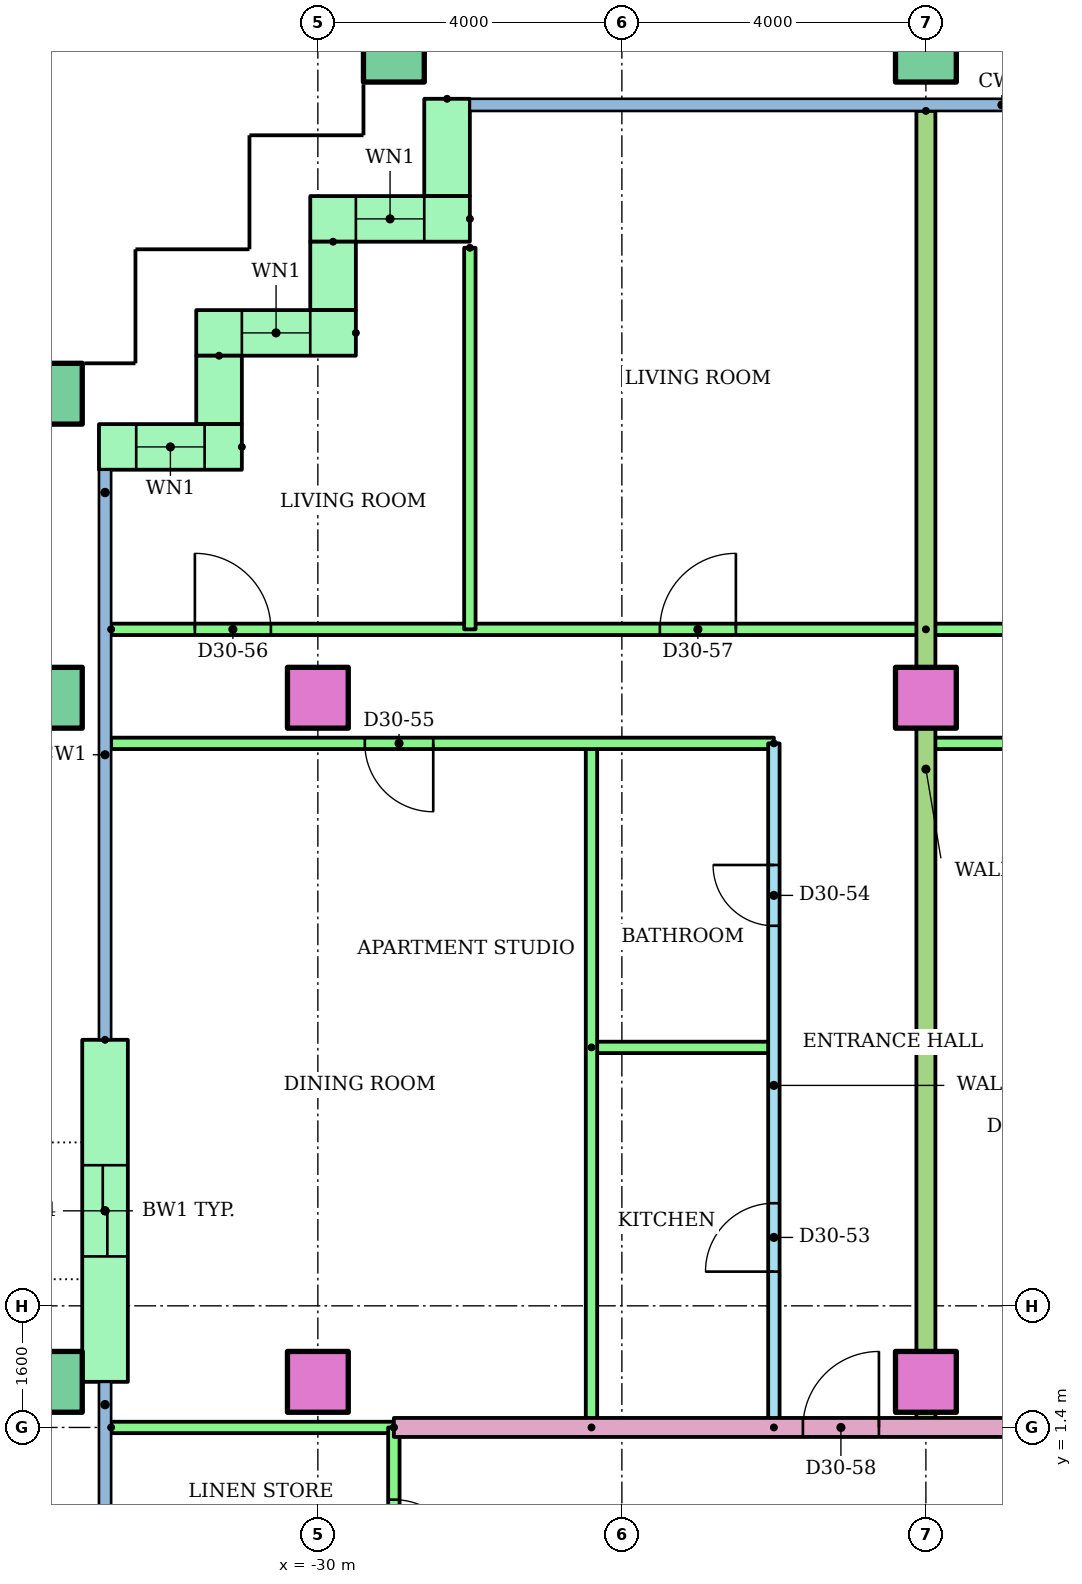
"""IFC4 building model, lengths in metres.
Left out: names, types, materials, properties, quantities, classifications, styles, units other than length and angle.
Written with IfcOpenShell. Run it as: python <this file> out.ifc"""

import sys

from ifc_helpers import new_model, si_unit, direction, frame, frame_2d, origin, origin_2d, place, context, subcontext, project, spatial, rectangle, hollow_rectangle, extrude, element, fill, save


model = new_model("IFC4")
c1 = context("Model", 3, precision=1e-05, world=origin(), true_north=direction((0.0, 1.0)))
c2 = subcontext(c1, "Body", "Model", "MODEL_VIEW")
j1 = project(units=[si_unit("LENGTHUNIT", "METRE"), si_unit("PLANEANGLEUNIT", "RADIAN")], contexts=[c1])
p1 = place(None, origin())
s1 = spatial("IfcSite", under=j1, at=p1, CompositionType="ELEMENT")
p2 = place(p1, origin())
s2 = spatial("IfcBuilding", under=s1, at=p2, CompositionType="ELEMENT")
p3 = place(p2, frame((0.0, 0.0, 119.8)))
s3 = spatial("IfcBuildingStorey", under=s2, at=p3, CompositionType="ELEMENT", Elevation=119.8)
p4 = place(p3, frame((-33.5, 2.0, 0.0)))
e1 = element("IfcColumn", 1, at=p4, inside=s3, PredefinedType="COLUMN", context=c2, shape_type="SweptSolid", body=[
    extrude(hollow_rectangle(XDim=0.8, YDim=0.8, WallThickness=0.04, at=origin_2d()), origin(), (0.0, 0.0, 1.0), 3.2),
])
for number, where in (
    (2, (-30.0, 2.0, 0.0)),
    (3, (-22.0, 2.0, 0.0)),
):
    element("IfcColumn", number, at=place(p3, frame(where)), inside=s3, PredefinedType="COLUMN", context=c2, shape_type="SweptSolid", body=[
        extrude(rectangle(XDim=0.8, YDim=0.8, at=origin_2d()), origin(), (0.0, 0.0, 1.0), 3.2),
    ])
p5 = place(p3, frame((-33.5, 11.0, 0.0)))
e4 = element("IfcColumn", 4, at=p5, inside=s3, PredefinedType="COLUMN", context=c2, shape_type="SweptSolid", body=[
    extrude(hollow_rectangle(XDim=0.8, YDim=0.8, WallThickness=0.04, at=origin_2d()), origin(), (0.0, 0.0, 1.0), 3.2),
])
for number, where in (
    (5, (-30.0, 11.0, 0.0)),
    (6, (-22.0, 11.0, 0.0)),
):
    element("IfcColumn", number, at=place(p3, frame(where)), inside=s3, PredefinedType="COLUMN", context=c2, shape_type="SweptSolid", body=[
        extrude(rectangle(XDim=0.8, YDim=0.8, at=origin_2d()), origin(), (0.0, 0.0, 1.0), 3.2),
    ])
for number, where in (
    (7, (-33.5, 15.0, 0.0)),
    (8, (-29.0, 19.5, 0.0)),
    (9, (-22.0, 19.5, 0.0)),
):
    element("IfcColumn", number, at=place(p3, frame(where)), inside=s3, PredefinedType="COLUMN", context=c2, shape_type="SweptSolid", body=[
        extrude(hollow_rectangle(XDim=0.8, YDim=0.8, WallThickness=0.04, at=origin_2d()), origin(), (0.0, 0.0, 1.0), 3.2),
    ])
p6 = place(p3, frame((-28.3, 18.88, 0.0), z_axis=(0.0, 0.0, 1.0), x_axis=(0.0, -1.0, 0.0)))
e10 = element("IfcWall", 10, at=p6, inside=s3, PredefinedType="STANDARD", context=c2, shape_type="SweptSolid", body=[
    extrude(rectangle(XDim=1.28, YDim=0.6, at=frame_2d((0.64, 0.0))), origin(), (0.0, 0.0, 1.0), 2.92),
])
p7 = place(p3, frame((-28.0, 17.3, 0.0), z_axis=(0.0, 0.0, 1.0), x_axis=(-1.0, 0.0, 0.0)))
e11 = element("IfcWall", 11, at=p7, inside=s3, PredefinedType="STANDARD", context=c2, shape_type="SweptSolid", body=[
    extrude(rectangle(XDim=2.1, YDim=0.6, at=frame_2d((1.05, 0.0))), origin(), (0.0, 0.0, 1.0), 2.92),
])
p8 = place(p7, frame((0.6, 0.0, 0.9)))
e12 = element("IfcOpeningElement", 12, at=p8, cuts=e11, PredefinedType="OPENING", context=c2, shape_type="SweptSolid", body=[
    extrude(rectangle(XDim=0.9, YDim=1.5, at=frame_2d((0.45, 0.75))), frame((0.0, 0.31, 0.0), z_axis=(0.0, -1.0, 0.0), x_axis=(1.0, 0.0, 0.0)), (0.0, 0.0, 1.0), 0.62),
])
p9 = place(p3, frame((-29.8, 17.0, 0.0), z_axis=(0.0, 0.0, 1.0), x_axis=(0.0, -1.0, 0.0)))
e13 = element("IfcWall", 13, at=p9, inside=s3, PredefinedType="STANDARD", context=c2, shape_type="SweptSolid", body=[
    extrude(rectangle(XDim=0.9, YDim=0.6, at=frame_2d((0.45, 0.0))), origin(), (0.0, 0.0, 1.0), 2.92),
])
p10 = place(p3, frame((-29.5, 15.8, 0.0), z_axis=(0.0, 0.0, 1.0), x_axis=(-1.0, 0.0, 0.0)))
e14 = element("IfcWall", 14, at=p10, inside=s3, PredefinedType="STANDARD", context=c2, shape_type="SweptSolid", body=[
    extrude(rectangle(XDim=2.1, YDim=0.6, at=frame_2d((1.05, 0.0))), origin(), (0.0, 0.0, 1.0), 2.92),
])
p11 = place(p10, frame((0.6, 0.0, 0.9)))
e15 = element("IfcOpeningElement", 15, at=p11, cuts=e14, PredefinedType="OPENING", context=c2, shape_type="SweptSolid", body=[
    extrude(rectangle(XDim=0.9, YDim=1.5, at=frame_2d((0.45, 0.75))), frame((0.0, 0.31, 0.0), z_axis=(0.0, -1.0, 0.0), x_axis=(1.0, 0.0, 0.0)), (0.0, 0.0, 1.0), 0.62),
])
p12 = place(p3, frame((-31.3, 15.5, 0.0), z_axis=(0.0, 0.0, 1.0), x_axis=(0.0, -1.0, 0.0)))
e16 = element("IfcWall", 16, at=p12, inside=s3, PredefinedType="STANDARD", context=c2, shape_type="SweptSolid", body=[
    extrude(rectangle(XDim=0.9, YDim=0.6, at=frame_2d((0.45, 0.0))), origin(), (0.0, 0.0, 1.0), 2.92),
])
p13 = place(p3, frame((-31.0, 14.3, 0.0), z_axis=(0.0, 0.0, 1.0), x_axis=(-1.0, 0.0, 0.0)))
e17 = element("IfcWall", 17, at=p13, inside=s3, PredefinedType="STANDARD", context=c2, shape_type="SweptSolid", body=[
    extrude(rectangle(XDim=1.88, YDim=0.6, at=frame_2d((0.94, 0.0))), origin(), (0.0, 0.0, 1.0), 2.92),
])
p14 = place(p13, frame((0.49, 0.0, 0.9)))
e18 = element("IfcOpeningElement", 18, at=p14, cuts=e17, PredefinedType="OPENING", context=c2, shape_type="SweptSolid", body=[
    extrude(rectangle(XDim=0.9, YDim=1.5, at=frame_2d((0.45, 0.75))), frame((0.0, 0.31, 0.0), z_axis=(0.0, -1.0, 0.0), x_axis=(1.0, 0.0, 0.0)), (0.0, 0.0, 1.0), 0.62),
])
p15 = place(p3, frame((-32.8, 6.5, 0.0), z_axis=(0.0, 0.0, 1.0), x_axis=(0.0, -1.0, 0.0)))
e19 = element("IfcWall", 19, at=p15, inside=s3, PredefinedType="STANDARD", context=c2, shape_type="SweptSolid", body=[
    extrude(rectangle(XDim=4.5, YDim=0.6, at=frame_2d((2.25, 0.0))), origin(), (0.0, 0.0, 1.0), 2.92),
])
p16 = place(p15, frame((1.65, 0.0, 0.0)))
e20 = element("IfcOpeningElement", 20, at=p16, cuts=e19, PredefinedType="OPENING", context=c2, shape_type="SweptSolid", body=[
    extrude(rectangle(XDim=1.2, YDim=2.1, at=frame_2d((0.6, 1.05))), frame((0.0, 0.31, 0.0), z_axis=(0.0, -1.0, 0.0), x_axis=(1.0, 0.0, 0.0)), (0.0, 0.0, 1.0), 0.62),
])
p17 = place(p3, frame((-24.0, 1.4, 0.0), z_axis=(0.0, 0.0, 1.0), x_axis=(0.0, 1.0, 0.0)))
e21 = element("IfcWall", 21, at=p17, inside=s3, PredefinedType="PARTITIONING", context=c2, shape_type="SweptSolid", body=[
    extrude(rectangle(XDim=9.0, YDim=0.15, at=frame_2d((4.5, 0.0))), origin(), (0.0, 0.0, 1.0), 2.4),
])
p18 = place(p17, frame((2.05, 0.0, 0.0)))
e22 = element("IfcOpeningElement", 22, at=p18, cuts=e21, PredefinedType="OPENING", context=c2, shape_type="SweptSolid", body=[
    extrude(rectangle(XDim=0.9, YDim=2.1, at=frame_2d((0.45, 1.05))), frame((0.0, 0.085, 0.0), z_axis=(0.0, -1.0, 0.0), x_axis=(1.0, 0.0, 0.0)), (0.0, 0.0, 1.0), 0.17),
])
p19 = place(p17, frame((6.6, 0.0, 0.0)))
e23 = element("IfcOpeningElement", 23, at=p19, cuts=e21, PredefinedType="OPENING", context=c2, shape_type="SweptSolid", body=[
    extrude(rectangle(XDim=0.8, YDim=2.1, at=frame_2d((0.4, 1.05))), frame((0.0, 0.085, 0.0), z_axis=(0.0, -1.0, 0.0), x_axis=(1.0, 0.0, 0.0)), (0.0, 0.0, 1.0), 0.17),
])
p20 = place(p3, frame((-26.4, 6.4, 0.0)))
e24 = element("IfcWall", 24, at=p20, inside=s3, PredefinedType="PARTITIONING", context=c2, shape_type="SweptSolid", body=[
    extrude(rectangle(XDim=2.4, YDim=0.15, at=frame_2d((1.2, 0.0))), origin(), (0.0, 0.0, 1.0), 2.4),
])
p21 = place(p3, frame((-26.4, 1.4, 0.0), z_axis=(0.0, 0.0, 1.0), x_axis=(0.0, 1.0, 0.0)))
e25 = element("IfcWall", 25, at=p21, inside=s3, PredefinedType="PARTITIONING", context=c2, shape_type="SweptSolid", body=[
    extrude(rectangle(XDim=9.0, YDim=0.15, at=frame_2d((4.5, 0.0))), origin(), (0.0, 0.0, 1.0), 2.4),
])
p22 = place(p3, frame((-24.0, 10.4, 0.0), z_axis=(0.0, 0.0, 1.0), x_axis=(-1.0, 0.0, 0.0)))
e26 = element("IfcWall", 26, at=p22, inside=s3, PredefinedType="PARTITIONING", context=c2, shape_type="SweptSolid", body=[
    extrude(rectangle(XDim=8.72, YDim=0.15, at=frame_2d((4.36, 0.0))), origin(), (0.0, 0.0, 1.0), 2.4),
])
p23 = place(p22, frame((4.482, 0.0, 0.0)))
e27 = element("IfcOpeningElement", 27, at=p23, cuts=e26, PredefinedType="OPENING", context=c2, shape_type="SweptSolid", body=[
    extrude(rectangle(XDim=0.9, YDim=2.1, at=frame_2d((0.45, 1.05))), frame((0.0, 0.085, 0.0), z_axis=(0.0, -1.0, 0.0), x_axis=(1.0, 0.0, 0.0)), (0.0, 0.0, 1.0), 0.17),
])
p24 = place(p3, frame((-32.72, 11.9, 0.0)))
e28 = element("IfcWall", 28, at=p24, inside=s3, PredefinedType="PARTITIONING", context=c2, shape_type="SweptSolid", body=[
    extrude(rectangle(XDim=10.72, YDim=0.15, at=frame_2d((5.36, 0.0))), origin(), (0.0, 0.0, 1.0), 2.4),
])
p25 = place(p24, frame((1.102, 0.0, 0.0)))
e29 = element("IfcOpeningElement", 29, at=p25, cuts=e28, PredefinedType="OPENING", context=c2, shape_type="SweptSolid", body=[
    extrude(rectangle(XDim=1.0, YDim=2.1, at=frame_2d((0.5, 1.05))), frame((0.0, 0.085, 0.0), z_axis=(0.0, -1.0, 0.0), x_axis=(1.0, 0.0, 0.0)), (0.0, 0.0, 1.0), 0.17),
])
p26 = place(p24, frame((7.22, 0.0, 0.0)))
e30 = element("IfcOpeningElement", 30, at=p26, cuts=e28, PredefinedType="OPENING", context=c2, shape_type="SweptSolid", body=[
    extrude(rectangle(XDim=1.0, YDim=2.1, at=frame_2d((0.5, 1.05))), frame((0.0, 0.085, 0.0), z_axis=(0.0, -1.0, 0.0), x_axis=(1.0, 0.0, 0.0)), (0.0, 0.0, 1.0), 0.17),
])
p27 = place(p3, frame((-28.0, 16.92, 0.0), z_axis=(0.0, 0.0, 1.0), x_axis=(0.0, -1.0, 0.0)))
e31 = element("IfcWall", 31, at=p27, inside=s3, PredefinedType="PARTITIONING", context=c2, shape_type="SweptSolid", body=[
    extrude(rectangle(XDim=5.02, YDim=0.15, at=frame_2d((2.51, 0.0))), origin(), (0.0, 0.0, 1.0), 2.4),
])
p28 = place(p3, frame((-16.0, 10.4, 0.0), z_axis=(0.0, 0.0, 1.0), x_axis=(-1.0, 0.0, 0.0)))
e32 = element("IfcWall", 32, at=p28, inside=s3, PredefinedType="PARTITIONING", context=c2, shape_type="SweptSolid", body=[
    extrude(rectangle(XDim=6.0, YDim=0.15, at=frame_2d((3.0, 0.0))), origin(), (0.0, 0.0, 1.0), 2.4),
])
p29 = place(p28, frame((3.75, 0.0, 0.0)))
e33 = element("IfcOpeningElement", 33, at=p29, cuts=e32, PredefinedType="OPENING", context=c2, shape_type="SweptSolid", body=[
    extrude(rectangle(XDim=0.9, YDim=2.1, at=frame_2d((0.45, 1.05))), frame((0.0, 0.085, 0.0), z_axis=(0.0, -1.0, 0.0), x_axis=(1.0, 0.0, 0.0)), (0.0, 0.0, 1.0), 0.17),
])
p30 = place(p3, frame((-22.0, 11.9, 0.0)))
e34 = element("IfcWall", 34, at=p30, inside=s3, PredefinedType="PARTITIONING", context=c2, shape_type="SweptSolid", body=[
    extrude(rectangle(XDim=8.0, YDim=0.15, at=frame_2d((4.0, 0.0))), origin(), (0.0, 0.0, 1.0), 2.4),
])
p31 = place(p30, frame((3.5, 0.0, 0.0)))
e35 = element("IfcOpeningElement", 35, at=p31, cuts=e34, PredefinedType="OPENING", context=c2, shape_type="SweptSolid", body=[
    extrude(rectangle(XDim=1.0, YDim=2.1, at=frame_2d((0.5, 1.05))), frame((0.0, 0.085, 0.0), z_axis=(0.0, -1.0, 0.0), x_axis=(1.0, 0.0, 0.0)), (0.0, 0.0, 1.0), 0.17),
])
p32 = place(p3, frame((-22.0, 18.721, 0.0), z_axis=(0.0, 0.0, 1.0), x_axis=(0.0, -1.0, 0.0)))
e36 = element("IfcWall", 36, at=p32, inside=s3, PredefinedType="PARTITIONING", context=c2, shape_type="SweptSolid", body=[
    extrude(rectangle(XDim=17.321, YDim=0.25, at=frame_2d((8.661, 0.0))), origin(), (0.0, 0.0, 1.0), 2.4),
])
p33 = place(p3, frame((-29.0, 1.4, 0.0)))
e37 = element("IfcWall", 37, at=p33, inside=s3, PredefinedType="PARTITIONING", context=c2, shape_type="SweptSolid", body=[
    extrude(rectangle(XDim=15.0, YDim=0.25, at=frame_2d((7.5, 0.0))), origin(), (0.0, 0.0, 1.0), 2.4),
])
p34 = place(p33, frame((5.382, 0.0, 0.0)))
e38 = element("IfcOpeningElement", 38, at=p34, cuts=e37, PredefinedType="OPENING", context=c2, shape_type="SweptSolid", body=[
    extrude(rectangle(XDim=1.0, YDim=2.1, at=frame_2d((0.5, 1.05))), frame((0.0, 0.135, 0.0), z_axis=(0.0, -1.0, 0.0), x_axis=(1.0, 0.0, 0.0)), (0.0, 0.0, 1.0), 0.27),
])
p35 = place(p33, frame((13.5, 0.0, 0.0)))
e39 = element("IfcOpeningElement", 39, at=p35, cuts=e37, PredefinedType="OPENING", context=c2, shape_type="SweptSolid", body=[
    extrude(rectangle(XDim=1.0, YDim=2.1, at=frame_2d((0.5, 1.05))), frame((0.0, 0.135, 0.0), z_axis=(0.0, -1.0, 0.0), x_axis=(1.0, 0.0, 0.0)), (0.0, 0.0, 1.0), 0.27),
])
p36 = place(p3, frame((-32.72, 1.4, 0.0)))
e40 = element("IfcWall", 40, at=p36, inside=s3, PredefinedType="PARTITIONING", context=c2, shape_type="SweptSolid", body=[
    extrude(rectangle(XDim=3.72, YDim=0.15, at=frame_2d((1.86, 0.0))), origin(), (0.0, 0.0, 1.0), 2.4),
])
p37 = place(p3, frame((-29.0, 1.4, 0.0), z_axis=(0.0, 0.0, 1.0), x_axis=(0.0, -1.0, 0.0)))
e41 = element("IfcWall", 41, at=p37, inside=s3, PredefinedType="PARTITIONING", context=c2, shape_type="SweptSolid", body=[
    extrude(rectangle(XDim=2.8, YDim=0.15, at=frame_2d((1.4, 0.0))), origin(), (0.0, 0.0, 1.0), 2.4),
])
p38 = place(p37, frame((0.95, 0.0, 0.0)))
e42 = element("IfcOpeningElement", 42, at=p38, cuts=e41, PredefinedType="OPENING", context=c2, shape_type="SweptSolid", body=[
    extrude(rectangle(XDim=0.9, YDim=2.1, at=frame_2d((0.45, 1.05))), frame((0.0, 0.085, 0.0), z_axis=(0.0, -1.0, 0.0), x_axis=(1.0, 0.0, 0.0)), (0.0, 0.0, 1.0), 0.17),
])
p39 = place(p8, origin())
e43 = element("IfcWindow", 43, at=p39, inside=s3, PartitioningType="SINGLE_PANEL", PredefinedType="WINDOW", context=c2, shape_type="SweptSolid", body=[
    extrude(rectangle(XDim=0.9, YDim=1.5, at=frame_2d((0.45, 0.75))), frame((0.0, 0.03, 0.0), z_axis=(0.0, -1.0, 0.0), x_axis=(1.0, 0.0, 0.0)), (0.0, 0.0, 1.0), 0.06),
])
fill(e12, e43)
p40 = place(p11, origin())
e44 = element("IfcWindow", 44, at=p40, inside=s3, PartitioningType="SINGLE_PANEL", PredefinedType="WINDOW", context=c2, shape_type="SweptSolid", body=[
    extrude(rectangle(XDim=0.9, YDim=1.5, at=frame_2d((0.45, 0.75))), frame((0.0, 0.03, 0.0), z_axis=(0.0, -1.0, 0.0), x_axis=(1.0, 0.0, 0.0)), (0.0, 0.0, 1.0), 0.06),
])
fill(e15, e44)
p41 = place(p14, origin())
e45 = element("IfcWindow", 45, at=p41, inside=s3, PartitioningType="SINGLE_PANEL", PredefinedType="WINDOW", context=c2, shape_type="SweptSolid", body=[
    extrude(rectangle(XDim=0.9, YDim=1.5, at=frame_2d((0.45, 0.75))), frame((0.0, 0.03, 0.0), z_axis=(0.0, -1.0, 0.0), x_axis=(1.0, 0.0, 0.0)), (0.0, 0.0, 1.0), 0.06),
])
fill(e18, e45)
p42 = place(p18, origin())
e46 = element("IfcDoor", 46, at=p42, inside=s3, OperationType="SINGLE_SWING_LEFT", PredefinedType="DOOR", context=c2, shape_type="SweptSolid", body=[
    extrude(rectangle(XDim=0.9, YDim=2.1, at=frame_2d((0.45, 1.05))), frame((0.0, 0.025, 0.0), z_axis=(0.0, -1.0, 0.0), x_axis=(1.0, 0.0, 0.0)), (0.0, 0.0, 1.0), 0.05),
])
fill(e22, e46)
p43 = place(p19, origin())
e47 = element("IfcDoor", 47, at=p43, inside=s3, OperationType="SINGLE_SWING_RIGHT", PredefinedType="DOOR", context=c2, shape_type="SweptSolid", body=[
    extrude(rectangle(XDim=0.8, YDim=2.1, at=frame_2d((0.4, 1.05))), frame((0.0, 0.025, 0.0), z_axis=(0.0, -1.0, 0.0), x_axis=(1.0, 0.0, 0.0)), (0.0, 0.0, 1.0), 0.05),
])
fill(e23, e47)
p44 = place(p23, origin())
e48 = element("IfcDoor", 48, at=p44, inside=s3, OperationType="SINGLE_SWING_LEFT", PredefinedType="DOOR", context=c2, shape_type="SweptSolid", body=[
    extrude(rectangle(XDim=0.9, YDim=2.1, at=frame_2d((0.45, 1.05))), frame((0.0, 0.025, 0.0), z_axis=(0.0, -1.0, 0.0), x_axis=(1.0, 0.0, 0.0)), (0.0, 0.0, 1.0), 0.05),
])
fill(e27, e48)
p45 = place(p25, origin())
e49 = element("IfcDoor", 49, at=p45, inside=s3, OperationType="SINGLE_SWING_LEFT", PredefinedType="DOOR", context=c2, shape_type="SweptSolid", body=[
    extrude(rectangle(XDim=1.0, YDim=2.1, at=frame_2d((0.5, 1.05))), frame((0.0, 0.025, 0.0), z_axis=(0.0, -1.0, 0.0), x_axis=(1.0, 0.0, 0.0)), (0.0, 0.0, 1.0), 0.05),
])
fill(e29, e49)
p46 = place(p26, origin())
e50 = element("IfcDoor", 50, at=p46, inside=s3, OperationType="SINGLE_SWING_RIGHT", PredefinedType="DOOR", context=c2, shape_type="SweptSolid", body=[
    extrude(rectangle(XDim=1.0, YDim=2.1, at=frame_2d((0.5, 1.05))), frame((0.0, 0.025, 0.0), z_axis=(0.0, -1.0, 0.0), x_axis=(1.0, 0.0, 0.0)), (0.0, 0.0, 1.0), 0.05),
])
fill(e30, e50)
p47 = place(p34, origin())
e51 = element("IfcDoor", 51, at=p47, inside=s3, OperationType="SINGLE_SWING_RIGHT", PredefinedType="DOOR", context=c2, shape_type="SweptSolid", body=[
    extrude(rectangle(XDim=1.0, YDim=2.1, at=frame_2d((0.5, 1.05))), frame((0.0, 0.025, 0.0), z_axis=(0.0, -1.0, 0.0), x_axis=(1.0, 0.0, 0.0)), (0.0, 0.0, 1.0), 0.05),
])
fill(e38, e51)
p48 = place(p38, origin())
e52 = element("IfcDoor", 52, at=p48, inside=s3, OperationType="SINGLE_SWING_RIGHT", PredefinedType="DOOR", context=c2, shape_type="SweptSolid", body=[
    extrude(rectangle(XDim=0.9, YDim=2.1, at=frame_2d((0.45, 1.05))), frame((0.0, 0.025, 0.0), z_axis=(0.0, -1.0, 0.0), x_axis=(1.0, 0.0, 0.0)), (0.0, 0.0, 1.0), 0.05),
])
fill(e42, e52)
p49 = place(p16, origin())
e53 = element("IfcDoor", 53, at=p49, inside=s3, OperationType="SLIDING_TO_LEFT", PredefinedType="DOOR", context=c2, shape_type="SweptSolid", body=[
    extrude(rectangle(XDim=1.2, YDim=2.1, at=frame_2d((0.6, 1.05))), frame((0.0, 0.025, 0.0), z_axis=(0.0, -1.0, 0.0), x_axis=(1.0, 0.0, 0.0)), (0.0, 0.0, 1.0), 0.05),
])
fill(e20, e53)
save(model, sys.argv[1])
